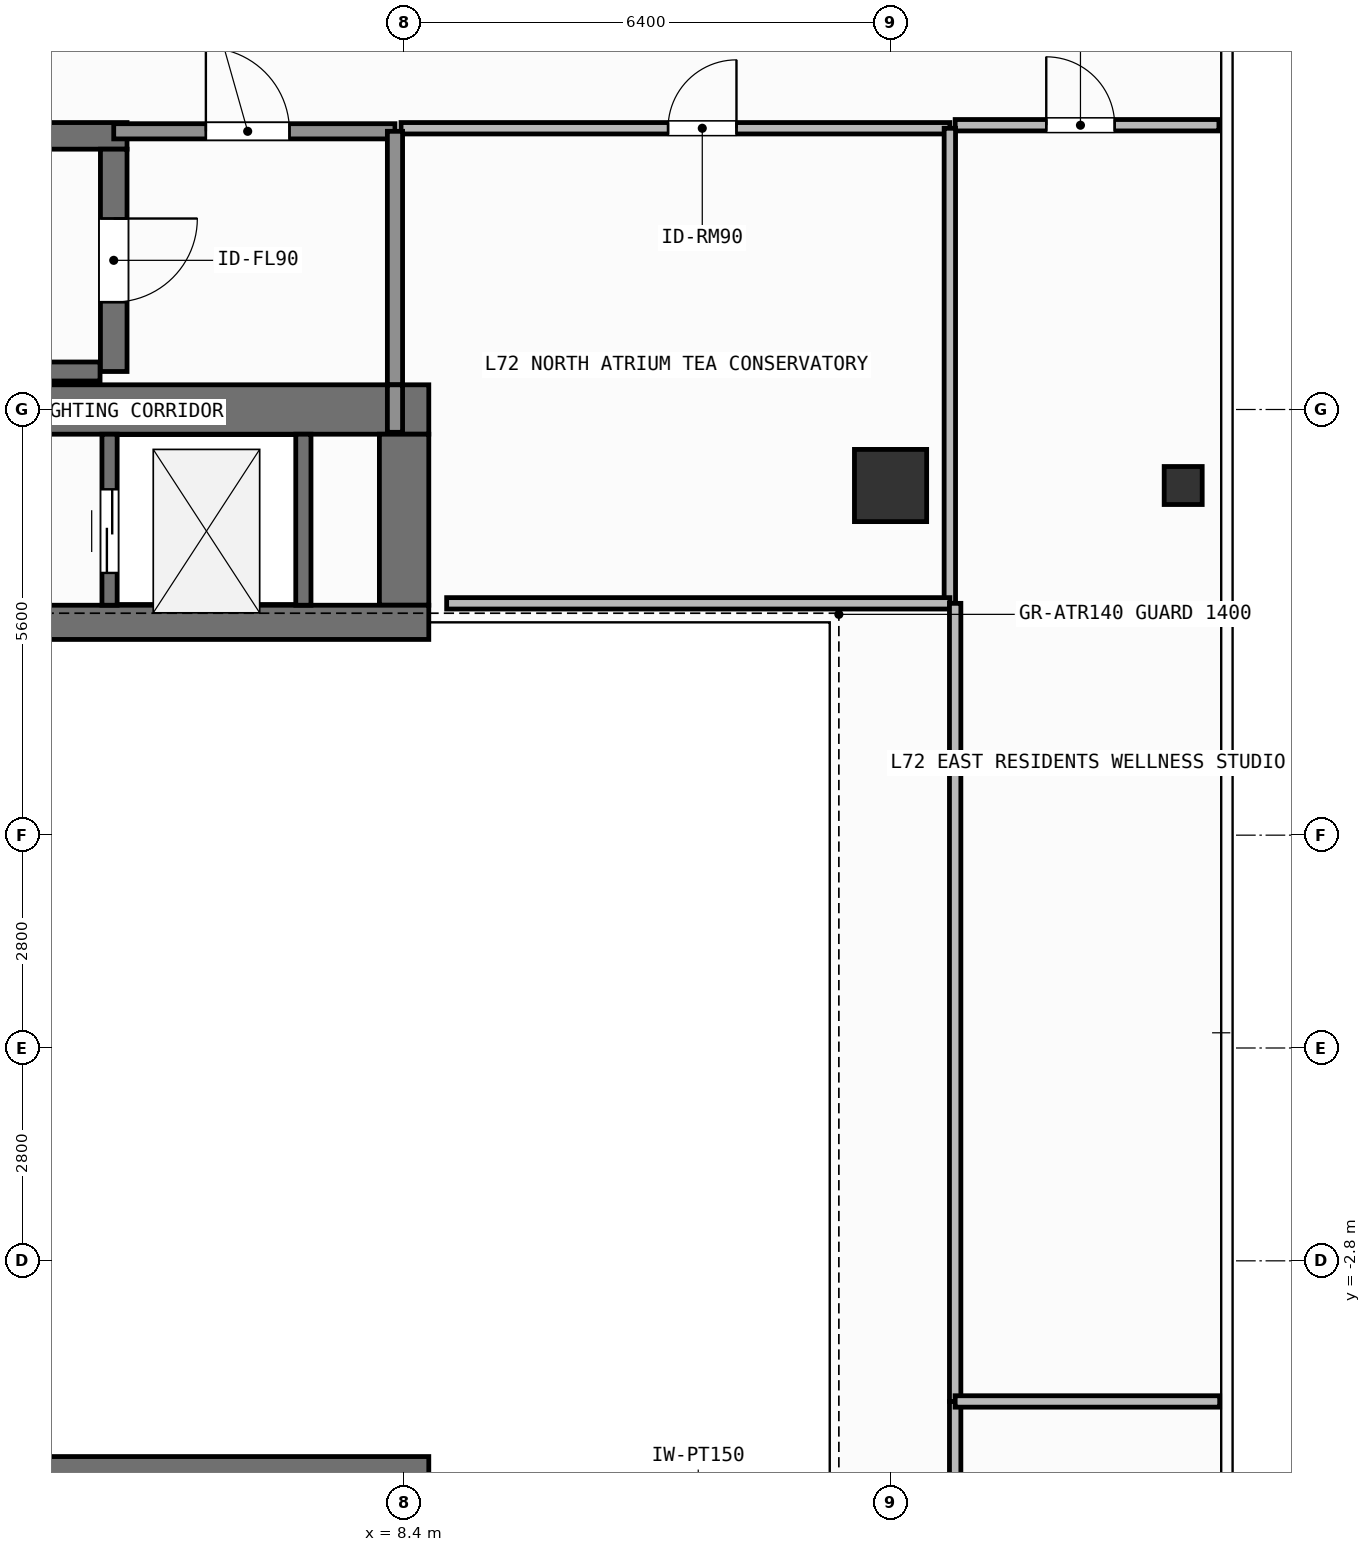
"""IFC4 building model, lengths in metres.
Left out: names, types, materials, properties, quantities, classifications, styles, units other than length and angle.
Written with IfcOpenShell. Run it as: python <this file> out.ifc"""

import sys

from ifc_helpers import new_model, si_unit, direction, frame, frame_2d, origin, origin_2d, place, context, subcontext, project, spatial, rectangle, hollow_rectangle, extrude, element, fill, save


model = new_model("IFC4")
c1 = context("Model", 3, precision=1e-05, world=origin(), true_north=direction((0.0, 1.0)))
c2 = subcontext(c1, "Body", "Model", "MODEL_VIEW")
j1 = project(units=[si_unit("LENGTHUNIT", "METRE"), si_unit("PLANEANGLEUNIT", "RADIAN")], contexts=[c1])
p1 = place(None, origin())
s1 = spatial("IfcSite", under=j1, at=p1, CompositionType="ELEMENT")
p2 = place(p1, origin())
s2 = spatial("IfcBuilding", under=s1, at=p2, CompositionType="ELEMENT")
p3 = place(p2, frame((0.0, 0.0, 293.7)))
s3 = spatial("IfcBuildingStorey", under=s2, at=p3, CompositionType="ELEMENT", Elevation=293.7)
p4 = place(p3, frame((-7.55, 8.4, 0.0), z_axis=(0.0, 0.0, 1.0), x_axis=(1.0, 0.0, 0.0)))
e1 = element("IfcWall", 1, at=p4, inside=s3, PredefinedType="SHEAR", context=c2, shape_type="SweptSolid", body=[
    extrude(rectangle(XDim=16.275, YDim=0.65, at=frame_2d((8.138, 0.0))), origin(), (0.0, 0.0, 1.0), 3.9),
])
p5 = place(p3, frame((8.4, 5.825, 0.0), z_axis=(0.0, 0.0, 1.0), x_axis=(0.0, 1.0, 0.0)))
e2 = element("IfcWall", 2, at=p5, inside=s3, PredefinedType="SHEAR", context=c2, shape_type="SweptSolid", body=[
    extrude(rectangle(XDim=2.25, YDim=0.65, at=frame_2d((1.125, 0.0))), origin(), (0.0, 0.0, 1.0), 3.9),
])
for number, where, z_axis, x_axis in (
    (3, (3.045, -5.6, 0.0), (0.0, 0.0, 1.0), (1.0, 0.0, 0.0)),
    (4, (3.045, 5.6, 0.0), (0.0, 0.0, 1.0), (1.0, 0.0, 0.0)),
):
    element("IfcWall", number, at=place(p3, frame(where, z_axis=z_axis, x_axis=x_axis)), inside=s3, PredefinedType="SHEAR", context=c2, shape_type="SweptSolid", body=[
        extrude(rectangle(XDim=5.68, YDim=0.45, at=frame_2d((2.84, 0.0))), origin(), (0.0, 0.0, 1.0), 3.9),
    ])
p6 = place(p3, frame((-2.555, 12.0, 0.0), z_axis=(0.0, 0.0, 1.0), x_axis=(1.0, 0.0, 0.0)))
e5 = element("IfcWall", 5, at=p6, inside=s3, PredefinedType="SHEAR", context=c2, shape_type="SweptSolid", body=[
    extrude(rectangle(XDim=7.31, YDim=0.35, at=frame_2d((3.655, 0.0))), origin(), (0.0, 0.0, 1.0), 3.9),
])
p7 = place(p3, frame((-2.2, 8.9, 0.0), z_axis=(0.0, 0.0, 1.0), x_axis=(1.0, 0.0, 0.0)))
e6 = element("IfcWall", 6, at=p7, inside=s3, PredefinedType="SHEAR", context=c2, shape_type="SweptSolid", body=[
    extrude(rectangle(XDim=6.6, YDim=0.25, at=frame_2d((3.3, 0.0))), origin(), (0.0, 0.0, 1.0), 3.9),
])
p8 = place(p3, frame((4.58, 11.825, 0.0), z_axis=(0.0, 0.0, 1.0), x_axis=(0.0, -1.0, 0.0)))
e7 = element("IfcWall", 7, at=p8, inside=s3, PredefinedType="SHEAR", context=c2, shape_type="SweptSolid", body=[
    extrude(rectangle(XDim=2.925, YDim=0.35, at=frame_2d((1.462, 0.0))), origin(), (0.0, 0.0, 1.0), 3.9),
])
p9 = place(p8, frame((0.913, 0.0, 0.0)))
e8 = element("IfcOpeningElement", 8, at=p9, cuts=e7, PredefinedType="OPENING", context=c2, shape_type="SweptSolid", body=[
    extrude(rectangle(XDim=1.1, YDim=2.15, at=frame_2d((0.55, 1.075))), frame((0.0, 0.185, 0.0), z_axis=(0.0, -1.0, 0.0), x_axis=(1.0, 0.0, 0.0)), (0.0, 0.0, 1.0), 0.37),
])
p10 = place(p3, frame((14.8, 7.4, 0.0), z_axis=(0.0, 0.0, 1.0), x_axis=(1.0, 0.0, 0.0)))
e9 = element("IfcColumn", 9, at=p10, inside=s3, PredefinedType="COLUMN", context=c2, shape_type="SweptSolid", body=[
    extrude(rectangle(XDim=0.95, YDim=0.95, at=origin_2d()), origin(), (0.0, 0.0, 1.0), 3.9),
])
p11 = place(p3, frame((18.65, 7.4, 0.0), z_axis=(0.0, 0.0, 1.0), x_axis=(1.0, 0.0, 0.0)))
e10 = element("IfcColumn", 10, at=p11, inside=s3, PredefinedType="COLUMN", context=c2, shape_type="SweptSolid", body=[
    extrude(hollow_rectangle(XDim=0.5, YDim=0.5, WallThickness=0.025, at=origin_2d()), origin(), (0.0, 0.0, 1.0), 3.9),
])
p12 = place(p3, frame((4.525, 5.825, 0.0), z_axis=(0.0, 0.0, 1.0), x_axis=(0.0, 1.0, 0.0)))
e11 = element("IfcWall", 11, at=p12, inside=s3, PredefinedType="SHEAR", context=c2, shape_type="SweptSolid", body=[
    extrude(rectangle(XDim=2.25, YDim=0.2, at=frame_2d((1.125, 0.0))), origin(), (0.0, 0.0, 1.0), 3.68),
])
p13 = place(p12, frame((0.425, 0.0, 0.0)))
e12 = element("IfcOpeningElement", 12, at=p13, cuts=e11, PredefinedType="OPENING", context=c2, shape_type="SweptSolid", body=[
    extrude(rectangle(XDim=1.1, YDim=2.2, at=frame_2d((0.55, 1.1))), frame((0.0, 0.11, 0.0), z_axis=(0.0, -1.0, 0.0), x_axis=(1.0, 0.0, 0.0)), (0.0, 0.0, 1.0), 0.22),
])
p14 = place(p3, frame((7.075, 5.825, 0.0), z_axis=(0.0, 0.0, 1.0), x_axis=(0.0, 1.0, 0.0)))
e13 = element("IfcWall", 13, at=p14, inside=s3, PredefinedType="SHEAR", context=c2, shape_type="SweptSolid", body=[
    extrude(rectangle(XDim=2.25, YDim=0.2, at=frame_2d((1.125, 0.0))), origin(), (0.0, 0.0, 1.0), 3.68),
])
p15 = place(p3, frame((4.58, 12.06, 0.0), z_axis=(0.0, 0.0, 1.0), x_axis=(1.0, 0.0, 0.0)))
e14 = element("IfcWall", 14, at=p15, inside=s3, PredefinedType="SOLIDWALL", context=c2, shape_type="SweptSolid", body=[
    extrude(rectangle(XDim=3.7, YDim=0.2, at=frame_2d((1.85, 0.0))), origin(), (0.0, 0.0, 1.0), 3.68),
])
p16 = place(p15, frame((1.212, 0.0, 0.0)))
e15 = element("IfcOpeningElement", 15, at=p16, cuts=e14, PredefinedType="OPENING", context=c2, shape_type="SweptSolid", body=[
    extrude(rectangle(XDim=1.1, YDim=2.15, at=frame_2d((0.55, 1.075))), frame((0.0, 0.11, 0.0), z_axis=(0.0, -1.0, 0.0), x_axis=(1.0, 0.0, 0.0)), (0.0, 0.0, 1.0), 0.22),
])
p17 = place(p3, frame((8.36, 12.1, 0.0), z_axis=(0.0, 0.0, 1.0), x_axis=(1.0, 0.0, 0.0)))
e16 = element("IfcWall", 16, at=p17, inside=s3, PredefinedType="PARTITIONING", context=c2, shape_type="SweptSolid", body=[
    extrude(rectangle(XDim=7.22, YDim=0.15, at=frame_2d((3.61, 0.0))), origin(), (0.0, 0.0, 1.0), 3.68),
])
p18 = place(p17, frame((3.513, 0.0, 0.0)))
e17 = element("IfcOpeningElement", 17, at=p18, cuts=e16, PredefinedType="OPENING", context=c2, shape_type="SweptSolid", body=[
    extrude(rectangle(XDim=0.9, YDim=2.1, at=frame_2d((0.45, 1.05))), frame((0.0, 0.085, 0.0), z_axis=(0.0, -1.0, 0.0), x_axis=(1.0, 0.0, 0.0)), (0.0, 0.0, 1.0), 0.17),
])
p19 = place(p3, frame((15.65, 12.14, 0.0), z_axis=(0.0, 0.0, 1.0), x_axis=(1.0, 0.0, 0.0)))
e18 = element("IfcWall", 18, at=p19, inside=s3, PredefinedType="PARTITIONING", context=c2, shape_type="SweptSolid", body=[
    extrude(rectangle(XDim=3.47, YDim=0.15, at=frame_2d((1.735, 0.0))), origin(), (0.0, 0.0, 1.0), 3.68),
])
p20 = place(p19, frame((1.198, 0.0, 0.0)))
e19 = element("IfcOpeningElement", 19, at=p20, cuts=e18, PredefinedType="OPENING", context=c2, shape_type="SweptSolid", body=[
    extrude(rectangle(XDim=0.9, YDim=2.1, at=frame_2d((0.45, 1.05))), frame((0.0, 0.085, 0.0), z_axis=(0.0, -1.0, 0.0), x_axis=(1.0, 0.0, 0.0)), (0.0, 0.0, 1.0), 0.17),
])
p21 = place(p3, frame((8.28, 8.725, 0.0), z_axis=(0.0, 0.0, 1.0), x_axis=(0.0, 1.0, 0.0)))
e20 = element("IfcWall", 20, at=p21, inside=s3, PredefinedType="SOLIDWALL", context=c2, shape_type="SweptSolid", body=[
    extrude(rectangle(XDim=3.335, YDim=0.2, at=frame_2d((1.667, 0.0))), origin(), (0.0, 0.0, 1.0), 3.68),
])
p22 = place(p3, frame((8.28, 8.1, 0.0), z_axis=(0.0, 0.0, 1.0), x_axis=(0.0, 1.0, 0.0)))
e21 = element("IfcWall", 21, at=p22, inside=s3, PredefinedType="SOLIDWALL", context=c2, shape_type="SweptSolid", body=[
    extrude(rectangle(XDim=0.625, YDim=0.2, at=frame_2d((0.312, 0.0))), origin(), (0.0, 0.0, 1.0), 3.68),
])
p23 = place(p3, frame((15.58, 5.85, 0.0), z_axis=(0.0, 0.0, 1.0), x_axis=(0.0, 1.0, 0.0)))
e22 = element("IfcWall", 22, at=p23, inside=s3, PredefinedType="PARTITIONING", context=c2, shape_type="SweptSolid", body=[
    extrude(rectangle(XDim=6.25, YDim=0.15, at=frame_2d((3.125, 0.0))), origin(), (0.0, 0.0, 1.0), 3.68),
])
p24 = place(p3, frame((8.96, 5.85, 0.0), z_axis=(0.0, 0.0, 1.0), x_axis=(1.0, 0.0, 0.0)))
e23 = element("IfcWall", 23, at=p24, inside=s3, PredefinedType="PARTITIONING", context=c2, shape_type="SweptSolid", body=[
    extrude(rectangle(XDim=6.62, YDim=0.15, at=frame_2d((3.31, 0.0))), origin(), (0.0, 0.0, 1.0), 3.68),
])
p25 = place(p3, frame((15.65, -5.85, 0.0), z_axis=(0.0, 0.0, 1.0), x_axis=(0.0, 1.0, 0.0)))
e24 = element("IfcWall", 24, at=p25, inside=s3, PredefinedType="PARTITIONING", context=c2, shape_type="SweptSolid", body=[
    extrude(rectangle(XDim=1.2, YDim=0.15, at=frame_2d((0.6, 0.0))), origin(), (0.0, 0.0, 1.0), 3.68),
])
p26 = place(p3, frame((15.65, -4.65, 0.0), z_axis=(0.0, 0.0, 1.0), x_axis=(0.0, 1.0, 0.0)))
e25 = element("IfcWall", 25, at=p26, inside=s3, PredefinedType="PARTITIONING", context=c2, shape_type="SweptSolid", body=[
    extrude(rectangle(XDim=10.5, YDim=0.15, at=frame_2d((5.25, 0.0))), origin(), (0.0, 0.0, 1.0), 3.68),
])
p27 = place(p3, frame((15.65, -4.65, 0.0), z_axis=(0.0, 0.0, 1.0), x_axis=(1.0, 0.0, 0.0)))
e26 = element("IfcWall", 26, at=p27, inside=s3, PredefinedType="PARTITIONING", context=c2, shape_type="SweptSolid", body=[
    extrude(rectangle(XDim=3.48, YDim=0.15, at=frame_2d((1.74, 0.0))), origin(), (0.0, 0.0, 1.0), 3.68),
])
p28 = place(p13, origin())
e27 = element("IfcDoor", 27, at=p28, inside=s3, OperationType="SLIDING_TO_LEFT", PredefinedType="DOOR", context=c2, shape_type="SweptSolid", body=[
    extrude(rectangle(XDim=1.1, YDim=2.2, at=frame_2d((0.55, 1.1))), frame((0.0, 0.025, 0.0), z_axis=(0.0, -1.0, 0.0), x_axis=(1.0, 0.0, 0.0)), (0.0, 0.0, 1.0), 0.05),
])
fill(e12, e27)
p29 = place(p9, origin())
e28 = element("IfcDoor", 28, at=p29, inside=s3, OperationType="SINGLE_SWING_LEFT", PredefinedType="DOOR", context=c2, shape_type="SweptSolid", body=[
    extrude(rectangle(XDim=1.1, YDim=2.15, at=frame_2d((0.55, 1.075))), frame((0.0, 0.025, 0.0), z_axis=(0.0, -1.0, 0.0), x_axis=(1.0, 0.0, 0.0)), (0.0, 0.0, 1.0), 0.05),
])
fill(e8, e28)
p30 = place(p16, origin())
e29 = element("IfcDoor", 29, at=p30, inside=s3, OperationType="SINGLE_SWING_LEFT", PredefinedType="DOOR", context=c2, shape_type="SweptSolid", body=[
    extrude(rectangle(XDim=1.1, YDim=2.15, at=frame_2d((0.55, 1.075))), frame((0.0, 0.025, 0.0), z_axis=(0.0, -1.0, 0.0), x_axis=(1.0, 0.0, 0.0)), (0.0, 0.0, 1.0), 0.05),
])
fill(e15, e29)
p31 = place(p18, origin())
e30 = element("IfcDoor", 30, at=p31, inside=s3, OperationType="SINGLE_SWING_RIGHT", PredefinedType="DOOR", context=c2, shape_type="SweptSolid", body=[
    extrude(rectangle(XDim=0.9, YDim=2.1, at=frame_2d((0.45, 1.05))), frame((0.0, 0.025, 0.0), z_axis=(0.0, -1.0, 0.0), x_axis=(1.0, 0.0, 0.0)), (0.0, 0.0, 1.0), 0.05),
])
fill(e17, e30)
p32 = place(p20, origin())
e31 = element("IfcDoor", 31, at=p32, inside=s3, OperationType="SINGLE_SWING_LEFT", PredefinedType="DOOR", context=c2, shape_type="SweptSolid", body=[
    extrude(rectangle(XDim=0.9, YDim=2.1, at=frame_2d((0.45, 1.05))), frame((0.0, 0.025, 0.0), z_axis=(0.0, -1.0, 0.0), x_axis=(1.0, 0.0, 0.0)), (0.0, 0.0, 1.0), 0.05),
])
fill(e19, e31)
save(model, sys.argv[1])
